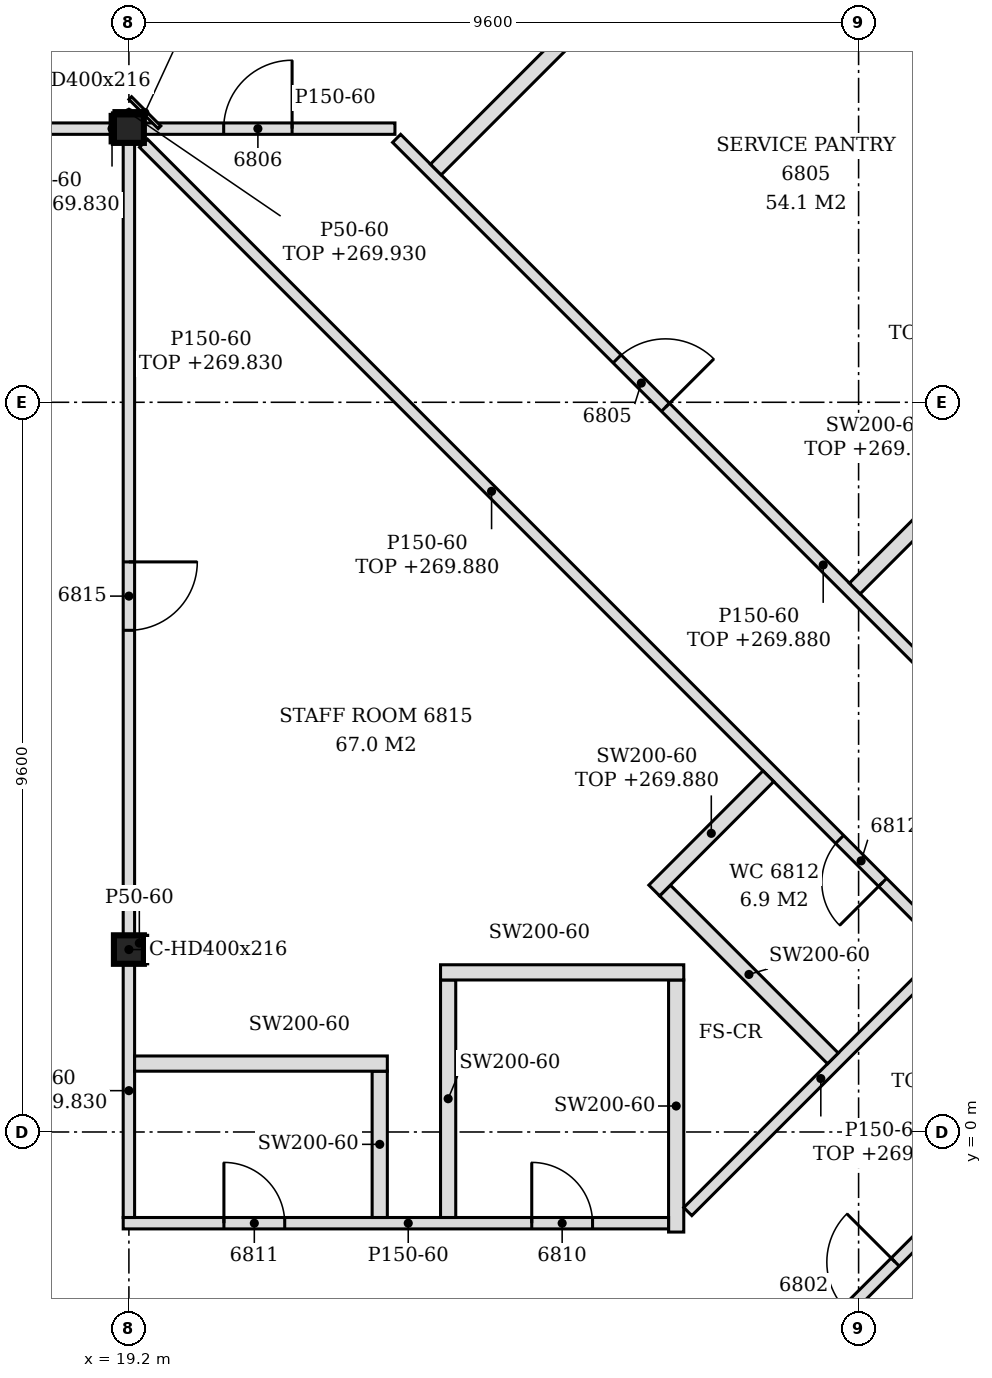
"""IFC4 building model, lengths in metres.
Left out: names, types, materials, properties, quantities, classifications, styles, units other than length and angle.
Written with IfcOpenShell. Run it as: python <this file> out.ifc"""

import sys

from ifc_helpers import new_model, si_unit, direction, frame, frame_2d, origin, origin_2d, place, context, subcontext, project, spatial, polyline, rectangle, i_section, outline, extrude, element, fill, save


model = new_model("IFC4")
c1 = context("Model", 3, precision=1e-05, world=origin(), true_north=direction((0.0, 1.0)))
c2 = subcontext(c1, "Body", "Model", "MODEL_VIEW")
j1 = project(units=[si_unit("LENGTHUNIT", "METRE"), si_unit("PLANEANGLEUNIT", "RADIAN")], contexts=[c1])
p1 = place(None, origin())
s1 = spatial("IfcSite", under=j1, at=p1, CompositionType="ELEMENT")
p2 = place(p1, origin())
s2 = spatial("IfcBuilding", under=s1, at=p2, CompositionType="ELEMENT")
p3 = place(p2, frame((0.0, 0.0, 267.0)))
s3 = spatial("IfcBuildingStorey", under=s2, at=p3, CompositionType="ELEMENT", Elevation=267.0)
for number, where, z_axis, x_axis in (
    (1, (19.2, 2.4, -0.15), (0.0, 0.0, 1.0), (1.0, 0.0, 0.0)),
    (2, (19.2, 13.2, -0.15), (0.0, 0.0, 1.0), (1.0, 0.0, 0.0)),
):
    element("IfcColumn", number, at=place(p3, frame(where, z_axis=z_axis, x_axis=x_axis)), inside=s3, PredefinedType="COLUMN", context=c2, shape_type="SweptSolid", body=[
        extrude(i_section(OverallWidth=0.394, OverallDepth=0.375, WebThickness=0.017, FlangeThickness=0.028, FilletRadius=0.015, at=origin_2d()), origin(), (0.0, 0.0, 1.0), 3.6),
    ])
p4 = place(p3, frame((14.322, -16.672, 0.0), z_axis=(0.0, 0.0, 1.0), x_axis=(0.707106781187, 0.707106781187, 0.0)))
e3 = element("IfcWall", 3, at=p4, inside=s3, PredefinedType="PARTITIONING", context=c2, shape_type="SweptSolid", body=[
    extrude(rectangle(XDim=23.452, YDim=0.15, at=frame_2d((11.726, 0.0))), origin(), (0.0, 0.0, 1.0), 2.73),
])
p5 = place(p4, frame((19.357, 0.0, 0.0)))
e4 = element("IfcOpeningElement", 4, at=p5, cuts=e3, PredefinedType="OPENING", context=c2, shape_type="SweptSolid", body=[
    extrude(rectangle(XDim=1.8, YDim=2.1, at=frame_2d((0.9, 1.05))), frame((0.0, 0.085, 0.0), z_axis=(0.0, -1.0, 0.0), x_axis=(1.0, 0.0, 0.0)), (0.0, 0.0, 1.0), 0.17),
])
p6 = place(p4, frame((2.975, 0.0, 0.0)))
e5 = element("IfcOpeningElement", 5, at=p6, cuts=e3, PredefinedType="OPENING", context=c2, shape_type="SweptSolid", body=[
    extrude(rectangle(XDim=0.9, YDim=2.1, at=frame_2d((0.45, 1.05))), frame((0.0, 0.085, 0.0), z_axis=(0.0, -1.0, 0.0), x_axis=(1.0, 0.0, 0.0)), (0.0, 0.0, 1.0), 0.17),
])
p7 = place(p4, frame((12.587, 0.0, 0.0)))
e6 = element("IfcOpeningElement", 6, at=p7, cuts=e3, PredefinedType="OPENING", context=c2, shape_type="SweptSolid", body=[
    extrude(rectangle(XDim=0.9, YDim=2.1, at=frame_2d((0.45, 1.05))), frame((0.0, 0.085, 0.0), z_axis=(0.0, -1.0, 0.0), x_axis=(1.0, 0.0, 0.0)), (0.0, 0.0, 1.0), 0.17),
])
p8 = place(p3, frame((26.4, -1.316, 0.0), z_axis=(0.0, 0.0, 1.0), x_axis=(0.0, 1.0, 0.0)))
e7 = element("IfcWall", 7, at=p8, inside=s3, PredefinedType="PARTITIONING", context=c2, shape_type="SweptSolid", body=[
    extrude(outline(polyline([(0.0, 0.0), (3.316, 0.0), (3.316, 3.45), (1.421, 3.45), (1.419, 2.88), (1.211, 2.88), (1.209, 3.45), (0.0, 3.45), (0.0, 0.0)])), frame((0.0, 0.1, 0.0), z_axis=(0.0, -1.0, 0.0), x_axis=(1.0, 0.0, 0.0)), (0.0, 0.0, 1.0), 0.2),
])
p9 = place(p3, frame((19.125, -1.2, 0.0), z_axis=(0.0, 0.0, 1.0), x_axis=(1.0, 0.0, 0.0)))
e8 = element("IfcWall", 8, at=p9, inside=s3, PredefinedType="PARTITIONING", context=c2, shape_type="SweptSolid", body=[
    extrude(outline(polyline([(0.0, 0.0), (7.175, 0.0), (7.175, 3.45), (0.225, 3.45), (0.223, 2.83), (0.0, 2.83), (0.0, 0.0)])), frame((0.0, 0.075, 0.0), z_axis=(0.0, -1.0, 0.0), x_axis=(1.0, 0.0, 0.0)), (0.0, 0.0, 1.0), 0.15),
])
p10 = place(p9, frame((5.375, 0.0, 0.0)))
e9 = element("IfcOpeningElement", 9, at=p10, cuts=e8, PredefinedType="OPENING", context=c2, shape_type="SweptSolid", body=[
    extrude(rectangle(XDim=0.8, YDim=2.1, at=frame_2d((0.4, 1.05))), frame((0.0, 0.085, 0.0), z_axis=(0.0, -1.0, 0.0), x_axis=(1.0, 0.0, 0.0)), (0.0, 0.0, 1.0), 0.17),
])
p11 = place(p9, frame((1.325, 0.0, 0.0)))
e10 = element("IfcOpeningElement", 10, at=p11, cuts=e8, PredefinedType="OPENING", context=c2, shape_type="SweptSolid", body=[
    extrude(rectangle(XDim=0.8, YDim=2.1, at=frame_2d((0.4, 1.05))), frame((0.0, 0.085, 0.0), z_axis=(0.0, -1.0, 0.0), x_axis=(1.0, 0.0, 0.0)), (0.0, 0.0, 1.0), 0.17),
])
p12 = place(p3, frame((19.2, -1.125, 0.0), z_axis=(0.0, 0.0, 1.0), x_axis=(0.0, 1.0, 0.0)))
e11 = element("IfcWall", 11, at=p12, inside=s3, PredefinedType="PARTITIONING", context=c2, shape_type="SweptSolid", body=[
    extrude(rectangle(XDim=3.337, YDim=0.15, at=frame_2d((1.669, 0.0))), origin(), (0.0, 0.0, 1.0), 2.83),
])
p13 = place(p3, frame((22.5, -1.125, 0.0), z_axis=(0.0, 0.0, 1.0), x_axis=(0.0, 1.0, 0.0)))
e12 = element("IfcWall", 12, at=p13, inside=s3, PredefinedType="PARTITIONING", context=c2, shape_type="SweptSolid", body=[
    extrude(outline(polyline([(0.0, 0.0), (1.925, 0.0), (1.925, 3.45), (1.23, 3.45), (1.228, 2.88), (1.02, 2.88), (1.018, 3.45), (0.0, 3.45), (0.0, 0.0)])), frame((0.0, 0.1, 0.0), z_axis=(0.0, -1.0, 0.0), x_axis=(1.0, 0.0, 0.0)), (0.0, 0.0, 1.0), 0.2),
])
p14 = place(p3, frame((23.4, -1.125, 0.0), z_axis=(0.0, 0.0, 1.0), x_axis=(0.0, 1.0, 0.0)))
e13 = element("IfcWall", 13, at=p14, inside=s3, PredefinedType="PARTITIONING", context=c2, shape_type="SweptSolid", body=[
    extrude(outline(polyline([(0.0, 0.0), (3.125, 0.0), (3.125, 3.45), (1.23, 3.45), (1.228, 2.88), (1.02, 2.88), (1.018, 3.45), (0.0, 3.45), (0.0, 0.0)])), frame((0.0, 0.1, 0.0), z_axis=(0.0, -1.0, 0.0), x_axis=(1.0, 0.0, 0.0)), (0.0, 0.0, 1.0), 0.2),
])
p15 = place(p3, frame((26.553, -1.047, 0.0), z_axis=(0.0, 0.0, 1.0), x_axis=(0.707106781187, 0.707106781187, 0.0)))
e14 = element("IfcWall", 14, at=p15, inside=s3, PredefinedType="PARTITIONING", context=c2, shape_type="SweptSolid", body=[
    extrude(rectangle(XDim=4.95, YDim=0.15, at=frame_2d((2.475, 0.0))), origin(), (0.0, 0.0, 1.0), 2.88),
])
p16 = place(p3, frame((19.275, 0.9, 0.0), z_axis=(0.0, 0.0, 1.0), x_axis=(1.0, 0.0, 0.0)))
e15 = element("IfcWall", 15, at=p16, inside=s3, PredefinedType="PARTITIONING", context=c2, shape_type="SweptSolid", body=[
    extrude(outline(polyline([(0.0, 0.0), (3.325, 0.0), (3.325, 3.45), (0.075, 3.45), (0.073, 2.83), (0.0, 2.83), (0.0, 0.0)])), frame((0.0, 0.1, 0.0), z_axis=(0.0, -1.0, 0.0), x_axis=(1.0, 0.0, 0.0)), (0.0, 0.0, 1.0), 0.2),
])
p17 = place(p3, frame((28.462, 0.968, 0.0), z_axis=(0.0, 0.0, 1.0), x_axis=(-0.707106781187, 0.707106781187, 0.0)))
e16 = element("IfcWall", 16, at=p17, inside=s3, PredefinedType="PARTITIONING", context=c2, shape_type="SweptSolid", body=[
    extrude(rectangle(XDim=3.124, YDim=0.2, at=frame_2d((1.562, 0.0))), origin(), (0.0, 0.0, 1.0), 3.45),
])
p18 = place(p3, frame((23.3, 2.1, 0.0), z_axis=(0.0, 0.0, 1.0), x_axis=(1.0, 0.0, 0.0)))
e17 = element("IfcWall", 17, at=p18, inside=s3, PredefinedType="PARTITIONING", context=c2, shape_type="SweptSolid", body=[
    extrude(rectangle(XDim=3.2, YDim=0.2, at=frame_2d((1.6, 0.0))), origin(), (0.0, 0.0, 1.0), 3.45),
])
p19 = place(p3, frame((29.947, 2.453, 0.0), z_axis=(0.0, 0.0, 1.0), x_axis=(-0.707098603185, 0.707114959093, 0.0)))
e18 = element("IfcWall", 18, at=p19, inside=s3, PredefinedType="PARTITIONING", context=c2, shape_type="SweptSolid", body=[
    extrude(rectangle(XDim=14.927, YDim=0.15, at=frame_2d((7.463, 0.0))), origin(), (0.0, 0.0, 1.0), 2.88),
])
p20 = place(p19, frame((1.175, 0.0, 0.0)))
e19 = element("IfcOpeningElement", 19, at=p20, cuts=e18, PredefinedType="OPENING", context=c2, shape_type="SweptSolid", body=[
    extrude(rectangle(XDim=0.8, YDim=2.1, at=frame_2d((0.4, 1.05))), frame((0.0, 0.085, 0.0), z_axis=(0.0, -1.0, 0.0), x_axis=(1.0, 0.0, 0.0)), (0.0, 0.0, 1.0), 0.17),
])
p21 = place(p3, frame((33.341, 2.453, 0.0), z_axis=(0.0, 0.0, 1.0), x_axis=(-0.707098652635, 0.707114909645, 0.0)))
e20 = element("IfcWall", 20, at=p21, inside=s3, PredefinedType="PARTITIONING", context=c2, shape_type="SweptSolid", body=[
    extrude(rectangle(XDim=15.018, YDim=0.15, at=frame_2d((7.509, 0.0))), origin(), (0.0, 0.0, 1.0), 2.88),
])
p22 = place(p21, frame((2.347, 0.0, 0.0)))
e21 = element("IfcOpeningElement", 21, at=p22, cuts=e20, PredefinedType="OPENING", context=c2, shape_type="SweptSolid", body=[
    extrude(rectangle(XDim=1.8, YDim=2.1, at=frame_2d((0.9, 1.05))), frame((0.0, 0.085, 0.0), z_axis=(0.0, -1.0, 0.0), x_axis=(1.0, 0.0, 0.0)), (0.0, 0.0, 1.0), 0.17),
])
p23 = place(p21, frame((0.247, 0.0, 0.0)))
e22 = element("IfcOpeningElement", 22, at=p23, cuts=e20, PredefinedType="OPENING", context=c2, shape_type="SweptSolid", body=[
    extrude(rectangle(XDim=1.8, YDim=2.1, at=frame_2d((0.9, 1.05))), frame((0.0, 0.085, 0.0), z_axis=(0.0, -1.0, 0.0), x_axis=(1.0, 0.0, 0.0)), (0.0, 0.0, 1.0), 0.17),
])
p24 = place(p21, frame((10.015, 0.0, 0.0)))
e23 = element("IfcOpeningElement", 23, at=p24, cuts=e20, PredefinedType="OPENING", context=c2, shape_type="SweptSolid", body=[
    extrude(rectangle(XDim=0.9, YDim=2.1, at=frame_2d((0.45, 1.05))), frame((0.0, 0.085, 0.0), z_axis=(0.0, -1.0, 0.0), x_axis=(1.0, 0.0, 0.0)), (0.0, 0.0, 1.0), 0.17),
])
p25 = place(p3, frame((19.2, 2.587, 0.0), z_axis=(0.0, 0.0, 1.0), x_axis=(0.0, 1.0, 0.0)))
e24 = element("IfcWall", 24, at=p25, inside=s3, PredefinedType="PARTITIONING", context=c2, shape_type="SweptSolid", body=[
    extrude(rectangle(XDim=10.425, YDim=0.15, at=frame_2d((5.212, 0.0))), origin(), (0.0, 0.0, 1.0), 2.83),
])
p26 = place(p25, frame((4.012, 0.0, 0.0)))
e25 = element("IfcOpeningElement", 25, at=p26, cuts=e24, PredefinedType="OPENING", context=c2, shape_type="SweptSolid", body=[
    extrude(rectangle(XDim=0.9, YDim=2.1, at=frame_2d((0.45, 1.05))), frame((0.0, 0.085, 0.0), z_axis=(0.0, -1.0, 0.0), x_axis=(1.0, 0.0, 0.0)), (0.0, 0.0, 1.0), 0.17),
])
p27 = place(p3, frame((26.111, 3.177, 0.0), z_axis=(0.0, 0.0, 1.0), x_axis=(0.70658957541, 0.707623608935, 0.0)))
e26 = element("IfcWall", 26, at=p27, inside=s3, PredefinedType="PARTITIONING", context=c2, shape_type="SweptSolid", body=[
    extrude(rectangle(XDim=2.125, YDim=0.2, at=frame_2d((1.062, 0.0))), origin(), (0.0, 0.0, 1.0), 2.88),
])
p28 = place(p3, frame((28.75, 7.15, 0.0), z_axis=(0.0, 0.0, 1.0), x_axis=(0.707106781187, 0.707106781187, 0.0)))
e27 = element("IfcWall", 27, at=p28, inside=s3, PredefinedType="PARTITIONING", context=c2, shape_type="SweptSolid", body=[
    extrude(rectangle(XDim=3.193, YDim=0.2, at=frame_2d((1.597, 0.0))), origin(), (0.0, 0.0, 1.0), 2.93),
])
p29 = place(p3, frame((23.238, 12.662, 0.0), z_axis=(0.0, 0.0, 1.0), x_axis=(0.707128276734, 0.707085284986, 0.0)))
e28 = element("IfcWall", 28, at=p29, inside=s3, PredefinedType="PARTITIONING", context=c2, shape_type="SweptSolid", body=[
    extrude(rectangle(XDim=5.679, YDim=0.2, at=frame_2d((2.839, 0.0))), origin(), (0.0, 0.0, 1.0), 2.93),
])
p30 = place(p3, frame((7.397, 13.2, 0.0), z_axis=(0.0, 0.0, 1.0), x_axis=(1.0, 0.0, 0.0)))
e29 = element("IfcWall", 29, at=p30, inside=s3, PredefinedType="PARTITIONING", context=c2, shape_type="SweptSolid", body=[
    extrude(rectangle(XDim=11.606, YDim=0.15, at=frame_2d((5.803, 0.0))), origin(), (0.0, 0.0, 1.0), 2.83),
])
p31 = place(p3, frame((19.397, 13.2, 0.0), z_axis=(0.0, 0.0, 1.0), x_axis=(1.0, 0.0, 0.0)))
e30 = element("IfcWall", 30, at=p31, inside=s3, PredefinedType="PARTITIONING", context=c2, shape_type="SweptSolid", body=[
    extrude(rectangle(XDim=3.303, YDim=0.15, at=frame_2d((1.652, 0.0))), origin(), (0.0, 0.0, 1.0), 3.45),
])
p32 = place(p31, frame((1.05, 0.0, 0.0)))
e31 = element("IfcOpeningElement", 31, at=p32, cuts=e30, PredefinedType="OPENING", context=c2, shape_type="SweptSolid", body=[
    extrude(rectangle(XDim=0.9, YDim=2.1, at=frame_2d((0.45, 1.05))), frame((0.0, 0.085, 0.0), z_axis=(0.0, -1.0, 0.0), x_axis=(1.0, 0.0, 0.0)), (0.0, 0.0, 1.0), 0.17),
])
p33 = place(p3, frame((19.422, 2.212, 0.0), z_axis=(0.0, 0.0, 1.0), x_axis=(0.0, 1.0, 0.0)))
e32 = element("IfcWall", 32, at=p33, inside=s3, PredefinedType="PARTITIONING", context=c2, shape_type="SweptSolid", body=[
    extrude(rectangle(XDim=0.375, YDim=0.05, at=frame_2d((0.188, 0.0))), origin(), (0.0, 0.0, 1.0), 3.45),
])
p34 = place(p3, frame((18.978, 13.012, 0.0), z_axis=(0.0, 0.0, 1.0), x_axis=(0.0, 1.0, 0.0)))
e33 = element("IfcWall", 33, at=p34, inside=s3, PredefinedType="PARTITIONING", context=c2, shape_type="SweptSolid", body=[
    extrude(rectangle(XDim=0.375, YDim=0.05, at=frame_2d((0.188, 0.0))), origin(), (0.0, 0.0, 1.0), 2.83),
])
p35 = place(p3, frame((19.602, 13.218, 0.0), z_axis=(0.0, 0.0, 1.0), x_axis=(-0.707106781187, 0.707106781187, 0.0)))
e34 = element("IfcWall", 34, at=p35, inside=s3, PredefinedType="PARTITIONING", context=c2, shape_type="SweptSolid", body=[
    extrude(rectangle(XDim=0.544, YDim=0.05, at=frame_2d((0.272, 0.0))), origin(), (0.0, 0.0, 1.0), 2.93),
])
p36 = place(p3, frame((19.003, 13.413, 0.0), z_axis=(0.0, 0.0, 1.0), x_axis=(1.0, 0.0, 0.0)))
e35 = element("IfcWall", 35, at=p36, inside=s3, PredefinedType="PARTITIONING", context=c2, shape_type="SweptSolid", body=[
    extrude(rectangle(XDim=0.394, YDim=0.05, at=frame_2d((0.197, 0.0))), origin(), (0.0, 0.0, 1.0), 2.93),
])
p37 = place(p5, frame((1.8, 0.0, 0.0), z_axis=(0.0, 0.0, 1.0), x_axis=(-1.0, 0.0, 0.0)))
e36 = element("IfcDoor", 36, at=p37, inside=s3, OperationType="DOUBLE_DOOR_SINGLE_SWING", PredefinedType="DOOR", context=c2, shape_type="SweptSolid", body=[
    extrude(rectangle(XDim=1.8, YDim=2.1, at=frame_2d((0.9, 1.05))), frame((0.0, 0.025, 0.0), z_axis=(0.0, -1.0, 0.0), x_axis=(1.0, 0.0, 0.0)), (0.0, 0.0, 1.0), 0.05),
])
fill(e4, e36)
p38 = place(p24, frame((0.9, 0.0, 0.0), z_axis=(0.0, 0.0, 1.0), x_axis=(-1.0, 0.0, 0.0)))
e37 = element("IfcDoor", 37, at=p38, inside=s3, OperationType="SINGLE_SWING_RIGHT", PredefinedType="DOOR", context=c2, shape_type="SweptSolid", body=[
    extrude(rectangle(XDim=0.9, YDim=2.1, at=frame_2d((0.45, 1.05))), frame((0.0, 0.025, 0.0), z_axis=(0.0, -1.0, 0.0), x_axis=(1.0, 0.0, 0.0)), (0.0, 0.0, 1.0), 0.05),
])
fill(e23, e37)
p39 = place(p32, origin())
e38 = element("IfcDoor", 38, at=p39, inside=s3, OperationType="SINGLE_SWING_RIGHT", PredefinedType="DOOR", context=c2, shape_type="SweptSolid", body=[
    extrude(rectangle(XDim=0.9, YDim=2.1, at=frame_2d((0.45, 1.05))), frame((0.0, 0.025, 0.0), z_axis=(0.0, -1.0, 0.0), x_axis=(1.0, 0.0, 0.0)), (0.0, 0.0, 1.0), 0.05),
])
fill(e31, e38)
p40 = place(p10, origin())
e39 = element("IfcDoor", 39, at=p40, inside=s3, OperationType="SINGLE_SWING_LEFT", PredefinedType="DOOR", context=c2, shape_type="SweptSolid", body=[
    extrude(rectangle(XDim=0.8, YDim=2.1, at=frame_2d((0.4, 1.05))), frame((0.0, 0.025, 0.0), z_axis=(0.0, -1.0, 0.0), x_axis=(1.0, 0.0, 0.0)), (0.0, 0.0, 1.0), 0.05),
])
fill(e9, e39)
p41 = place(p11, origin())
e40 = element("IfcDoor", 40, at=p41, inside=s3, OperationType="SINGLE_SWING_LEFT", PredefinedType="DOOR", context=c2, shape_type="SweptSolid", body=[
    extrude(rectangle(XDim=0.8, YDim=2.1, at=frame_2d((0.4, 1.05))), frame((0.0, 0.025, 0.0), z_axis=(0.0, -1.0, 0.0), x_axis=(1.0, 0.0, 0.0)), (0.0, 0.0, 1.0), 0.05),
])
fill(e10, e40)
p42 = place(p20, origin())
e41 = element("IfcDoor", 41, at=p42, inside=s3, OperationType="SINGLE_SWING_LEFT", PredefinedType="DOOR", context=c2, shape_type="SweptSolid", body=[
    extrude(rectangle(XDim=0.8, YDim=2.1, at=frame_2d((0.4, 1.05))), frame((0.0, 0.025, 0.0), z_axis=(0.0, -1.0, 0.0), x_axis=(1.0, 0.0, 0.0)), (0.0, 0.0, 1.0), 0.05),
])
fill(e19, e41)
p43 = place(p26, frame((0.9, 0.0, 0.0), z_axis=(0.0, 0.0, 1.0), x_axis=(-1.0, 0.0, 0.0)))
e42 = element("IfcDoor", 42, at=p43, inside=s3, OperationType="SINGLE_SWING_LEFT", PredefinedType="DOOR", context=c2, shape_type="SweptSolid", body=[
    extrude(rectangle(XDim=0.9, YDim=2.1, at=frame_2d((0.45, 1.05))), frame((0.0, 0.025, 0.0), z_axis=(0.0, -1.0, 0.0), x_axis=(1.0, 0.0, 0.0)), (0.0, 0.0, 1.0), 0.05),
])
fill(e25, e42)
save(model, sys.argv[1])
